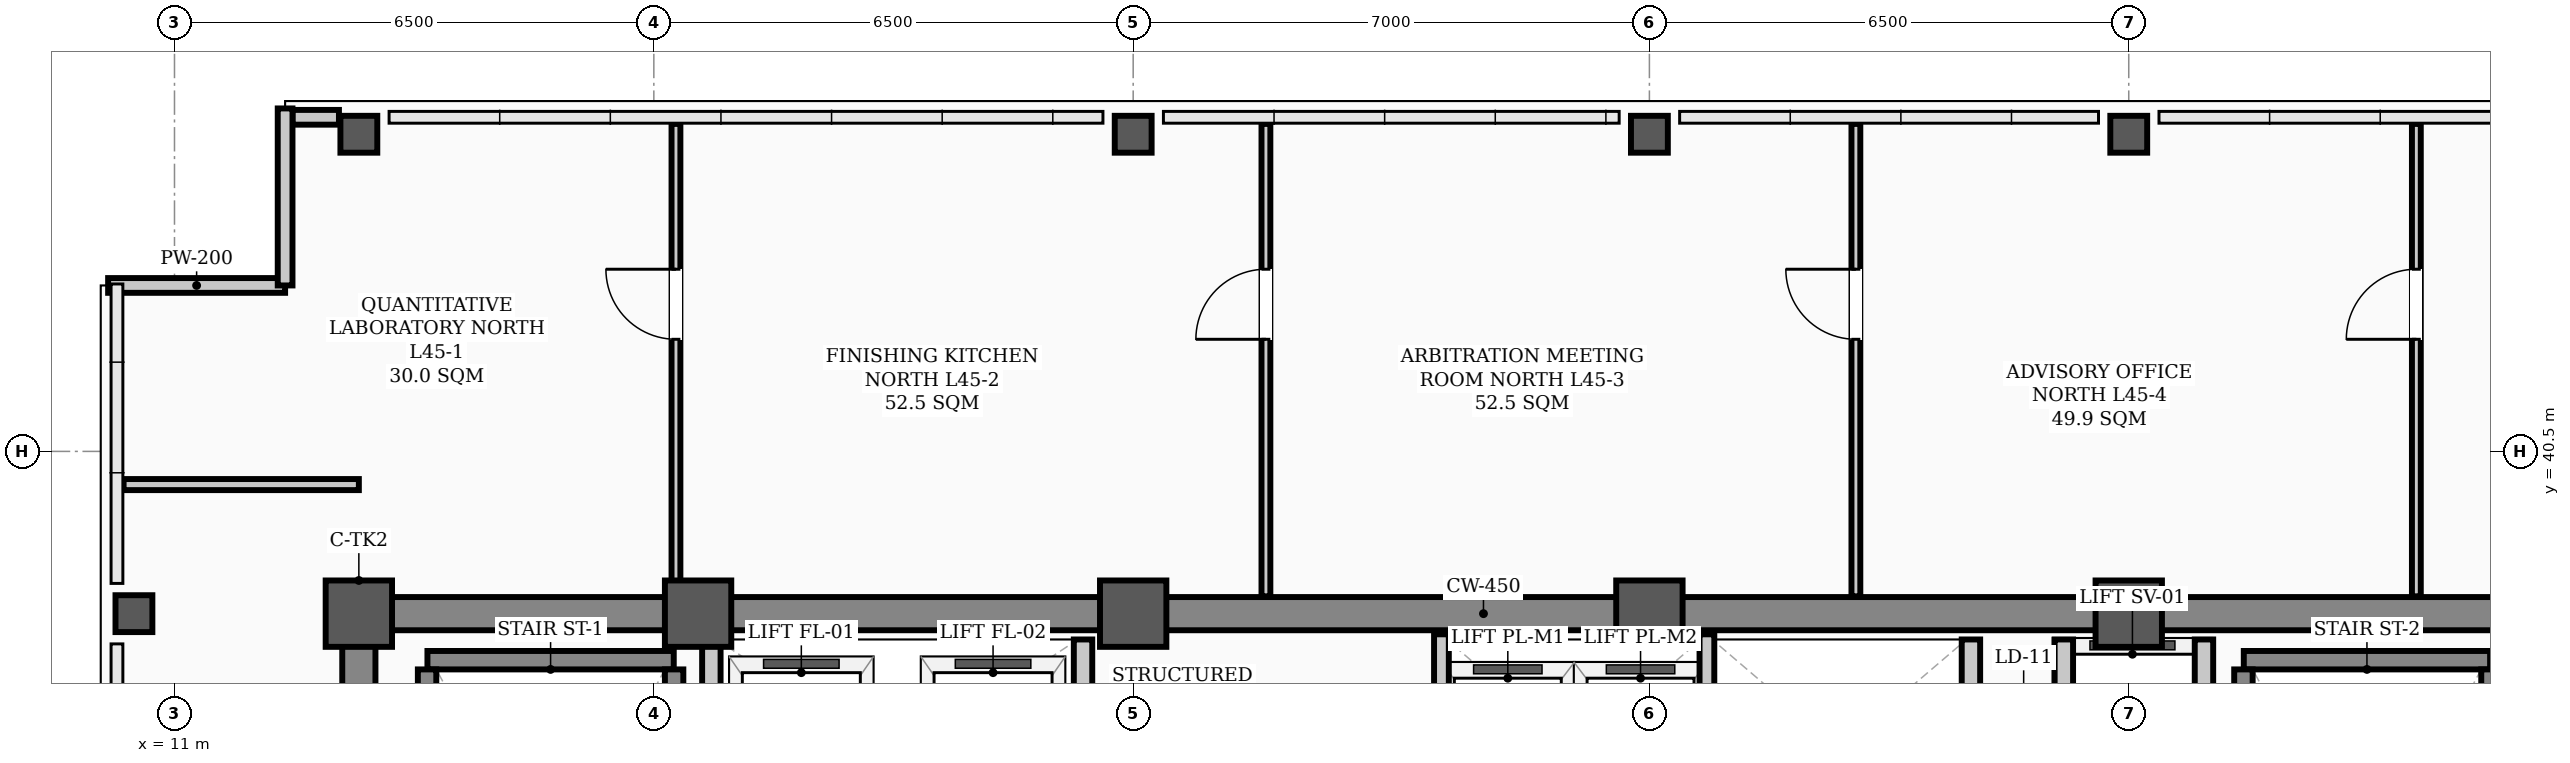
"""IFC4 building model, lengths in metres.
Left out: names, types, materials, properties, quantities, classifications, styles, units other than length and angle.
Written with IfcOpenShell. Run it as: python <this file> out.ifc"""

import sys

from ifc_helpers import new_model, si_unit, direction, frame, frame_2d, origin, origin_2d, place, context, subcontext, project, spatial, rectangle, hollow_rectangle, extrude, element, fill, save


model = new_model("IFC4")
c1 = context("Model", 3, precision=1e-05, world=origin(), true_north=direction((0.0, 1.0)))
c2 = subcontext(c1, "Body", "Model", "MODEL_VIEW")
j1 = project(units=[si_unit("LENGTHUNIT", "METRE"), si_unit("PLANEANGLEUNIT", "RADIAN")], contexts=[c1])
p1 = place(None, origin())
s1 = spatial("IfcSite", under=j1, at=p1, CompositionType="ELEMENT")
p2 = place(p1, origin())
s2 = spatial("IfcBuilding", under=s1, at=p2, CompositionType="ELEMENT")
p3 = place(p2, frame((0.0, 0.0, 181.2)))
s3 = spatial("IfcBuildingStorey", under=s2, at=p3, CompositionType="ELEMENT", Elevation=181.2)
for number, where, z_axis, x_axis in (
    (1, (13.5, 38.3, 0.0), (0.0, 0.0, 1.0), (1.0, 0.0, 0.0)),
    (2, (18.1, 38.3, 0.0), (0.0, 0.0, 1.0), (1.0, 0.0, 0.0)),
    (3, (24.0, 38.3, 0.0), (0.0, 0.0, 1.0), (1.0, 0.0, 0.0)),
    (4, (31.0, 38.3, 0.0), (0.0, 0.0, 1.0), (1.0, 0.0, 0.0)),
    (5, (37.5, 38.3, 0.0), (0.0, 0.0, 1.0), (1.0, 0.0, 0.0)),
):
    element("IfcColumn", number, at=place(p3, frame(where, z_axis=z_axis, x_axis=x_axis)), inside=s3, PredefinedType="COLUMN", context=c2, shape_type="SweptSolid", body=[
        extrude(hollow_rectangle(XDim=0.9, YDim=0.9, WallThickness=0.035, InnerFilletRadius=0.017, OuterFilletRadius=0.052, at=origin_2d()), origin(), (0.0, 0.0, 1.0), 3.9),
    ])
for number, where, z_axis, x_axis in (
    (6, (10.45, 38.3, 0.0), (0.0, 0.0, 1.0), (1.0, 0.0, 0.0)),
    (7, (13.5, 44.8, 0.0), (0.0, 0.0, 1.0), (1.0, 0.0, 0.0)),
    (8, (24.0, 44.8, 0.0), (0.0, 0.0, 1.0), (1.0, 0.0, 0.0)),
    (9, (31.0, 44.8, 0.0), (0.0, 0.0, 1.0), (1.0, 0.0, 0.0)),
    (10, (37.5, 44.8, 0.0), (0.0, 0.0, 1.0), (1.0, 0.0, 0.0)),
):
    element("IfcColumn", number, at=place(p3, frame(where, z_axis=z_axis, x_axis=x_axis)), inside=s3, PredefinedType="COLUMN", context=c2, shape_type="SweptSolid", body=[
        extrude(hollow_rectangle(XDim=0.5, YDim=0.5, WallThickness=0.024, InnerFilletRadius=0.012, OuterFilletRadius=0.036, at=origin_2d()), origin(), (0.0, 0.0, 1.0), 3.9),
    ])
p4 = place(p3, frame((12.6, 45.03, 0.0), z_axis=(0.0, 0.0, 1.0), x_axis=(1.0, 0.0, 0.0)))
e11 = element("IfcWall", 11, at=p4, inside=s3, PredefinedType="PARAPET", context=c2, shape_type="SweptSolid", body=[
    extrude(rectangle(XDim=0.63, YDim=0.2, at=frame_2d((0.315, 0.0))), origin(), (0.0, 0.0, 1.0), 1.2),
])
for number, where, z_axis, x_axis in (
    (12, (10.1, 42.75, 0.0), (0.0, 0.0, 1.0), (1.0, 0.0, 0.0)),
    (13, (12.5, 42.75, 0.0), (0.0, 0.0, 1.0), (0.0, 1.0, 0.0)),
):
    element("IfcWall", number, at=place(p3, frame(where, z_axis=z_axis, x_axis=x_axis)), inside=s3, PredefinedType="PARAPET", context=c2, shape_type="SweptSolid", body=[
        extrude(rectangle(XDim=2.4, YDim=0.2, at=frame_2d((1.2, 0.0))), origin(), (0.0, 0.0, 1.0), 1.2),
    ])
p5 = place(p3, frame((13.5, 38.3, 0.0), z_axis=(0.0, 0.0, 1.0), x_axis=(1.0, 0.0, 0.0)))
e14 = element("IfcWall", 14, at=p5, inside=s3, PredefinedType="SHEAR", context=c2, shape_type="SweptSolid", body=[
    extrude(rectangle(XDim=30.5, YDim=0.45, at=frame_2d((15.25, 0.0))), origin(), (0.0, 0.0, 1.0), 3.72),
])
p6 = place(p3, frame((13.5, 29.35, 0.0), z_axis=(0.0, 0.0, 1.0), x_axis=(0.0, 1.0, 0.0)))
e15 = element("IfcWall", 15, at=p6, inside=s3, PredefinedType="SHEAR", context=c2, shape_type="SweptSolid", body=[
    extrude(rectangle(XDim=8.6, YDim=0.45, at=frame_2d((4.3, 0.0))), origin(), (0.0, 0.0, 1.0), 3.72),
])
p7 = place(p3, frame((14.43, 37.669, 0.0), z_axis=(0.0, 0.0, 1.0), x_axis=(1.0, 0.0, 0.0)))
e16 = element("IfcWall", 16, at=p7, inside=s3, PredefinedType="STANDARD", context=c2, shape_type="SweptSolid", body=[
    extrude(rectangle(XDim=3.34, YDim=0.25, at=frame_2d((1.67, 0.0))), origin(), (0.0, 0.0, 1.0), 3.72),
])
for number, where, z_axis, x_axis in (
    (17, (14.425, 30.36, 0.0), (0.0, 0.0, 1.0), (0.0, 1.0, 0.0)),
    (18, (17.775, 30.36, 0.0), (0.0, 0.0, 1.0), (0.0, 1.0, 0.0)),
):
    element("IfcWall", number, at=place(p3, frame(where, z_axis=z_axis, x_axis=x_axis)), inside=s3, PredefinedType="STANDARD", context=c2, shape_type="SweptSolid", body=[
        extrude(rectangle(XDim=7.184, YDim=0.25, at=frame_2d((3.592, 0.0))), origin(), (0.0, 0.0, 1.0), 3.72),
    ])
p8 = place(p3, frame((39.06, 37.669, 0.0), z_axis=(0.0, 0.0, 1.0), x_axis=(1.0, 0.0, 0.0)))
e19 = element("IfcWall", 19, at=p8, inside=s3, PredefinedType="STANDARD", context=c2, shape_type="SweptSolid", body=[
    extrude(rectangle(XDim=3.34, YDim=0.25, at=frame_2d((1.67, 0.0))), origin(), (0.0, 0.0, 1.0), 3.72),
])
for number, where, z_axis, x_axis in (
    (20, (39.055, 30.36, 0.0), (0.0, 0.0, 1.0), (0.0, 1.0, 0.0)),
    (21, (42.405, 30.36, 0.0), (0.0, 0.0, 1.0), (0.0, 1.0, 0.0)),
):
    element("IfcWall", number, at=place(p3, frame(where, z_axis=z_axis, x_axis=x_axis)), inside=s3, PredefinedType="STANDARD", context=c2, shape_type="SweptSolid", body=[
        extrude(rectangle(XDim=7.184, YDim=0.25, at=frame_2d((3.592, 0.0))), origin(), (0.0, 0.0, 1.0), 3.72),
    ])
p9 = place(p3, frame((36.62, 31.95, 0.0), z_axis=(0.0, 0.0, 1.0), x_axis=(0.0, 1.0, 0.0)))
e22 = element("IfcWall", 22, at=p9, inside=s3, PredefinedType="STANDARD", context=c2, shape_type="SweptSolid", body=[
    extrude(rectangle(XDim=6.0, YDim=0.25, at=frame_2d((3.0, 0.0))), origin(), (0.0, 0.0, 1.0), 3.35),
])
p10 = place(p9, frame((0.9, 0.0, 0.0)))
e23 = element("IfcOpeningElement", 23, at=p10, cuts=e22, PredefinedType="OPENING", context=c2, shape_type="SweptSolid", body=[
    extrude(rectangle(XDim=1.1, YDim=2.08, at=frame_2d((0.55, 1.04))), frame((0.0, 0.135, 0.0), z_axis=(0.0, -1.0, 0.0), x_axis=(1.0, 0.0, 0.0)), (0.0, 0.0, 1.0), 0.27),
])
p11 = place(p9, frame((4.0, 0.0, 0.0)))
e24 = element("IfcOpeningElement", 24, at=p11, cuts=e22, PredefinedType="OPENING", context=c2, shape_type="SweptSolid", body=[
    extrude(rectangle(XDim=1.1, YDim=2.08, at=frame_2d((0.55, 1.04))), frame((0.0, 0.135, 0.0), z_axis=(0.0, -1.0, 0.0), x_axis=(1.0, 0.0, 0.0)), (0.0, 0.0, 1.0), 0.27),
])
p12 = place(p3, frame((38.52, 31.95, 0.0), z_axis=(0.0, 0.0, 1.0), x_axis=(0.0, 1.0, 0.0)))
e25 = element("IfcWall", 25, at=p12, inside=s3, PredefinedType="STANDARD", context=c2, shape_type="SweptSolid", body=[
    extrude(rectangle(XDim=6.0, YDim=0.25, at=frame_2d((3.0, 0.0))), origin(), (0.0, 0.0, 1.0), 3.35),
])
for number, where, z_axis, x_axis in (
    (26, (18.28, 34.62, 0.0), (0.0, 0.0, 1.0), (0.0, 1.0, 0.0)),
    (27, (23.32, 34.62, 0.0), (0.0, 0.0, 1.0), (0.0, 1.0, 0.0)),
):
    element("IfcWall", number, at=place(p3, frame(where, z_axis=z_axis, x_axis=x_axis)), inside=s3, PredefinedType="STANDARD", context=c2, shape_type="SweptSolid", body=[
        extrude(rectangle(XDim=3.33, YDim=0.25, at=frame_2d((1.665, 0.0))), origin(), (0.0, 0.0, 1.0), 3.35),
    ])
p13 = place(p3, frame((35.36, 34.9, 0.0), z_axis=(0.0, 0.0, 1.0), x_axis=(0.0, 1.0, 0.0)))
e28 = element("IfcWall", 28, at=p13, inside=s3, PredefinedType="STANDARD", context=c2, shape_type="SweptSolid", body=[
    extrude(rectangle(XDim=3.05, YDim=0.25, at=frame_2d((1.525, 0.0))), origin(), (0.0, 0.0, 1.0), 3.35),
])
p14 = place(p3, frame((10.31, 40.05, 0.0), z_axis=(0.0, 0.0, 1.0), x_axis=(1.0, 0.0, 0.0)))
e29 = element("IfcWall", 29, at=p14, inside=s3, PredefinedType="PARTITIONING", context=c2, shape_type="SweptSolid", body=[
    extrude(rectangle(XDim=3.19, YDim=0.15, at=frame_2d((1.595, 0.0))), origin(), (0.0, 0.0, 1.0), 3.2),
])
p15 = place(p3, frame((17.8, 38.535, 0.0), z_axis=(0.0, 0.0, 1.0), x_axis=(0.0, 1.0, 0.0)))
e30 = element("IfcWall", 30, at=p15, inside=s3, PredefinedType="PARTITIONING", context=c2, shape_type="SweptSolid", body=[
    extrude(rectangle(XDim=6.405, YDim=0.12, at=frame_2d((3.203, 0.0))), origin(), (0.0, 0.0, 1.0), 3.212),
])
p16 = place(p15, frame((3.485, 0.0, 0.0)))
e31 = element("IfcOpeningElement", 31, at=p16, cuts=e30, PredefinedType="OPENING", context=c2, shape_type="SweptSolid", body=[
    extrude(rectangle(XDim=0.95, YDim=2.08, at=frame_2d((0.475, 1.04))), frame((0.0, 0.07, 0.0), z_axis=(0.0, -1.0, 0.0), x_axis=(1.0, 0.0, 0.0)), (0.0, 0.0, 1.0), 0.14),
])
p17 = place(p3, frame((25.8, 38.535, 0.0), z_axis=(0.0, 0.0, 1.0), x_axis=(0.0, 1.0, 0.0)))
e32 = element("IfcWall", 32, at=p17, inside=s3, PredefinedType="PARTITIONING", context=c2, shape_type="SweptSolid", body=[
    extrude(rectangle(XDim=6.405, YDim=0.12, at=frame_2d((3.203, 0.0))), origin(), (0.0, 0.0, 1.0), 3.212),
])
p18 = place(p17, frame((3.485, 0.0, 0.0)))
e33 = element("IfcOpeningElement", 33, at=p18, cuts=e32, PredefinedType="OPENING", context=c2, shape_type="SweptSolid", body=[
    extrude(rectangle(XDim=0.95, YDim=2.08, at=frame_2d((0.475, 1.04))), frame((0.0, 0.07, 0.0), z_axis=(0.0, -1.0, 0.0), x_axis=(1.0, 0.0, 0.0)), (0.0, 0.0, 1.0), 0.14),
])
p19 = place(p3, frame((33.8, 38.535, 0.0), z_axis=(0.0, 0.0, 1.0), x_axis=(0.0, 1.0, 0.0)))
e34 = element("IfcWall", 34, at=p19, inside=s3, PredefinedType="PARTITIONING", context=c2, shape_type="SweptSolid", body=[
    extrude(rectangle(XDim=6.405, YDim=0.12, at=frame_2d((3.203, 0.0))), origin(), (0.0, 0.0, 1.0), 3.212),
])
p20 = place(p19, frame((3.485, 0.0, 0.0)))
e35 = element("IfcOpeningElement", 35, at=p20, cuts=e34, PredefinedType="OPENING", context=c2, shape_type="SweptSolid", body=[
    extrude(rectangle(XDim=0.95, YDim=2.08, at=frame_2d((0.475, 1.04))), frame((0.0, 0.07, 0.0), z_axis=(0.0, -1.0, 0.0), x_axis=(1.0, 0.0, 0.0)), (0.0, 0.0, 1.0), 0.14),
])
p21 = place(p3, frame((41.4, 38.535, 0.0), z_axis=(0.0, 0.0, 1.0), x_axis=(0.0, 1.0, 0.0)))
e36 = element("IfcWall", 36, at=p21, inside=s3, PredefinedType="PARTITIONING", context=c2, shape_type="SweptSolid", body=[
    extrude(rectangle(XDim=6.405, YDim=0.12, at=frame_2d((3.203, 0.0))), origin(), (0.0, 0.0, 1.0), 3.212),
])
p22 = place(p21, frame((3.485, 0.0, 0.0)))
e37 = element("IfcOpeningElement", 37, at=p22, cuts=e36, PredefinedType="OPENING", context=c2, shape_type="SweptSolid", body=[
    extrude(rectangle(XDim=0.95, YDim=2.08, at=frame_2d((0.475, 1.04))), frame((0.0, 0.07, 0.0), z_axis=(0.0, -1.0, 0.0), x_axis=(1.0, 0.0, 0.0)), (0.0, 0.0, 1.0), 0.14),
])
for number, where, z_axis, x_axis in (
    (38, (28.18, 34.9, 0.0), (0.0, 0.0, 1.0), (0.0, 1.0, 0.0)),
    (39, (31.78, 34.9, 0.0), (0.0, 0.0, 1.0), (0.0, 1.0, 0.0)),
):
    element("IfcWall", number, at=place(p3, frame(where, z_axis=z_axis, x_axis=x_axis)), inside=s3, PredefinedType="STANDARD", context=c2, shape_type="SweptSolid", body=[
        extrude(rectangle(XDim=3.12, YDim=0.2, at=frame_2d((1.56, 0.0))), origin(), (0.0, 0.0, 1.0), 3.35),
    ])
p23 = place(p16, origin())
e40 = element("IfcDoor", 40, at=p23, inside=s3, OperationType="SINGLE_SWING_RIGHT", PredefinedType="DOOR", context=c2, shape_type="SweptSolid", body=[
    extrude(rectangle(XDim=0.95, YDim=2.08, at=frame_2d((0.475, 1.04))), frame((0.0, 0.025, 0.0), z_axis=(0.0, -1.0, 0.0), x_axis=(1.0, 0.0, 0.0)), (0.0, 0.0, 1.0), 0.05),
])
fill(e31, e40)
p24 = place(p18, origin())
e41 = element("IfcDoor", 41, at=p24, inside=s3, OperationType="SINGLE_SWING_LEFT", PredefinedType="DOOR", context=c2, shape_type="SweptSolid", body=[
    extrude(rectangle(XDim=0.95, YDim=2.08, at=frame_2d((0.475, 1.04))), frame((0.0, 0.025, 0.0), z_axis=(0.0, -1.0, 0.0), x_axis=(1.0, 0.0, 0.0)), (0.0, 0.0, 1.0), 0.05),
])
fill(e33, e41)
p25 = place(p20, origin())
e42 = element("IfcDoor", 42, at=p25, inside=s3, OperationType="SINGLE_SWING_RIGHT", PredefinedType="DOOR", context=c2, shape_type="SweptSolid", body=[
    extrude(rectangle(XDim=0.95, YDim=2.08, at=frame_2d((0.475, 1.04))), frame((0.0, 0.025, 0.0), z_axis=(0.0, -1.0, 0.0), x_axis=(1.0, 0.0, 0.0)), (0.0, 0.0, 1.0), 0.05),
])
fill(e35, e42)
p26 = place(p22, origin())
e43 = element("IfcDoor", 43, at=p26, inside=s3, OperationType="SINGLE_SWING_LEFT", PredefinedType="DOOR", context=c2, shape_type="SweptSolid", body=[
    extrude(rectangle(XDim=0.95, YDim=2.08, at=frame_2d((0.475, 1.04))), frame((0.0, 0.025, 0.0), z_axis=(0.0, -1.0, 0.0), x_axis=(1.0, 0.0, 0.0)), (0.0, 0.0, 1.0), 0.05),
])
fill(e37, e43)
save(model, sys.argv[1])
